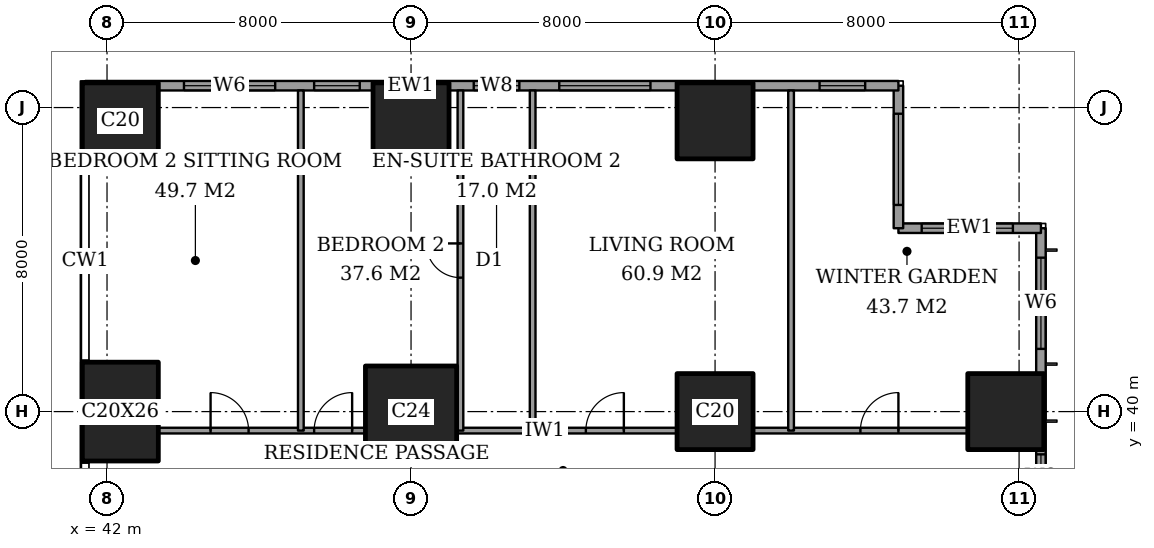
"""IFC4 building model, lengths in metres.
Left out: names, types, materials, properties, quantities, classifications, styles, units other than length and angle.
Written with IfcOpenShell. Run it as: python <this file> out.ifc"""

import sys

from ifc_helpers import new_model, si_unit, direction, frame, frame_2d, origin, origin_2d, place, context, subcontext, project, spatial, rectangle, extrude, element, fill, save


model = new_model("IFC4")
c1 = context("Model", 3, precision=1e-05, world=origin(), true_north=direction((0.0, 1.0)))
c2 = subcontext(c1, "Body", "Model", "MODEL_VIEW")
j1 = project(units=[si_unit("LENGTHUNIT", "METRE"), si_unit("PLANEANGLEUNIT", "RADIAN")], contexts=[c1])
p1 = place(None, origin())
s1 = spatial("IfcSite", under=j1, at=p1, CompositionType="ELEMENT")
p2 = place(p1, origin())
s2 = spatial("IfcBuilding", under=s1, at=p2, CompositionType="ELEMENT")
p3 = place(p2, frame((0.0, 0.0, 33.2)))
s3 = spatial("IfcBuildingStorey", under=s2, at=p3, CompositionType="ELEMENT", Elevation=33.2)
p4 = place(p3, frame((42.35, 40.0, 0.0), z_axis=(0.0, 0.0, 1.0), x_axis=(1.0, 0.0, 0.0)))
e1 = element("IfcColumn", 1, at=p4, inside=s3, PredefinedType="COLUMN", context=c2, shape_type="SweptSolid", body=[
    extrude(rectangle(XDim=2.0, YDim=2.6, at=origin_2d()), origin(), (0.0, 0.0, 1.0), 3.6),
])
p5 = place(p3, frame((42.35, 47.65, 0.0), z_axis=(0.0, 0.0, 1.0), x_axis=(1.0, 0.0, 0.0)))
e2 = element("IfcColumn", 2, at=p5, inside=s3, PredefinedType="COLUMN", context=c2, shape_type="SweptSolid", body=[
    extrude(rectangle(XDim=2.0, YDim=2.0, at=origin_2d()), origin(), (0.0, 0.0, 1.0), 3.6),
])
p6 = place(p3, frame((50.0, 40.0, 0.0), z_axis=(0.0, 0.0, 1.0), x_axis=(1.0, 0.0, 0.0)))
e3 = element("IfcColumn", 3, at=p6, inside=s3, PredefinedType="COLUMN", context=c2, shape_type="SweptSolid", body=[
    extrude(rectangle(XDim=2.4, YDim=2.4, at=origin_2d()), origin(), (0.0, 0.0, 1.0), 3.6),
])
for number, where, z_axis, x_axis in (
    (4, (50.0, 47.65, 0.0), (0.0, 0.0, 1.0), (1.0, 0.0, 0.0)),
    (5, (58.0, 40.0, 0.0), (0.0, 0.0, 1.0), (1.0, 0.0, 0.0)),
    (6, (58.0, 47.65, 0.0), (0.0, 0.0, 1.0), (1.0, 0.0, 0.0)),
    (7, (65.65, 40.0, 0.0), (0.0, 0.0, 1.0), (1.0, 0.0, 0.0)),
):
    element("IfcColumn", number, at=place(p3, frame(where, z_axis=z_axis, x_axis=x_axis)), inside=s3, PredefinedType="COLUMN", context=c2, shape_type="SweptSolid", body=[
        extrude(rectangle(XDim=2.0, YDim=2.0, at=origin_2d()), origin(), (0.0, 0.0, 1.0), 3.6),
    ])
p7 = place(p3, frame((66.575, 3.175, 0.0), z_axis=(0.0, 0.0, 1.0), x_axis=(0.0, 1.0, 0.0)))
e8 = element("IfcWall", 8, at=p7, inside=s3, PredefinedType="SOLIDWALL", context=c2, shape_type="SweptSolid", body=[
    extrude(rectangle(XDim=41.65, YDim=0.25, at=frame_2d((20.825, 0.0))), origin(), (0.0, 0.0, 1.0), 3.6),
])
p8 = place(p7, frame((0.775, 0.0, 0.6)))
e9 = element("IfcOpeningElement", 9, at=p8, cuts=e8, PredefinedType="OPENING", context=c2, shape_type="SweptSolid", body=[
    extrude(rectangle(XDim=2.4, YDim=2.0, at=frame_2d((1.2, 1.0))), frame((0.0, 0.135, 0.0), z_axis=(0.0, -1.0, 0.0), x_axis=(1.0, 0.0, 0.0)), (0.0, 0.0, 1.0), 0.27),
])
p9 = place(p7, frame((6.1, 0.0, 0.6)))
e10 = element("IfcOpeningElement", 10, at=p9, cuts=e8, PredefinedType="OPENING", context=c2, shape_type="SweptSolid", body=[
    extrude(rectangle(XDim=1.2, YDim=2.0, at=frame_2d((0.6, 1.0))), frame((0.0, 0.135, 0.0), z_axis=(0.0, -1.0, 0.0), x_axis=(1.0, 0.0, 0.0)), (0.0, 0.0, 1.0), 0.27),
])
p10 = place(p7, frame((8.275, 0.0, 0.6)))
e11 = element("IfcOpeningElement", 11, at=p10, cuts=e8, PredefinedType="OPENING", context=c2, shape_type="SweptSolid", body=[
    extrude(rectangle(XDim=2.4, YDim=2.0, at=frame_2d((1.2, 1.0))), frame((0.0, 0.135, 0.0), z_axis=(0.0, -1.0, 0.0), x_axis=(1.0, 0.0, 0.0)), (0.0, 0.0, 1.0), 0.27),
])
p11 = place(p7, frame((15.775, 0.0, 0.6)))
e12 = element("IfcOpeningElement", 12, at=p11, cuts=e8, PredefinedType="OPENING", context=c2, shape_type="SweptSolid", body=[
    extrude(rectangle(XDim=2.4, YDim=2.0, at=frame_2d((1.2, 1.0))), frame((0.0, 0.135, 0.0), z_axis=(0.0, -1.0, 0.0), x_axis=(1.0, 0.0, 0.0)), (0.0, 0.0, 1.0), 0.27),
])
p12 = place(p7, frame((23.475, 0.0, 0.6)))
e13 = element("IfcOpeningElement", 13, at=p12, cuts=e8, PredefinedType="OPENING", context=c2, shape_type="SweptSolid", body=[
    extrude(rectangle(XDim=2.4, YDim=2.0, at=frame_2d((1.2, 1.0))), frame((0.0, 0.135, 0.0), z_axis=(0.0, -1.0, 0.0), x_axis=(1.0, 0.0, 0.0)), (0.0, 0.0, 1.0), 0.27),
])
p13 = place(p7, frame((30.975, 0.0, 0.6)))
e14 = element("IfcOpeningElement", 14, at=p13, cuts=e8, PredefinedType="OPENING", context=c2, shape_type="SweptSolid", body=[
    extrude(rectangle(XDim=2.4, YDim=2.0, at=frame_2d((1.2, 1.0))), frame((0.0, 0.135, 0.0), z_axis=(0.0, -1.0, 0.0), x_axis=(1.0, 0.0, 0.0)), (0.0, 0.0, 1.0), 0.27),
])
p14 = place(p7, frame((34.5, 0.0, 0.6)))
e15 = element("IfcOpeningElement", 15, at=p14, cuts=e8, PredefinedType="OPENING", context=c2, shape_type="SweptSolid", body=[
    extrude(rectangle(XDim=1.2, YDim=2.0, at=frame_2d((0.6, 1.0))), frame((0.0, 0.135, 0.0), z_axis=(0.0, -1.0, 0.0), x_axis=(1.0, 0.0, 0.0)), (0.0, 0.0, 1.0), 0.27),
])
p15 = place(p7, frame((38.475, 0.0, 0.6)))
e16 = element("IfcOpeningElement", 16, at=p15, cuts=e8, PredefinedType="OPENING", context=c2, shape_type="SweptSolid", body=[
    extrude(rectangle(XDim=2.4, YDim=2.0, at=frame_2d((1.2, 1.0))), frame((0.0, 0.135, 0.0), z_axis=(0.0, -1.0, 0.0), x_axis=(1.0, 0.0, 0.0)), (0.0, 0.0, 1.0), 0.27),
])
p16 = place(p3, frame((66.575, 44.825, 0.0), z_axis=(0.0, 0.0, 1.0), x_axis=(-1.0, 0.0, 0.0)))
e17 = element("IfcWall", 17, at=p16, inside=s3, PredefinedType="SOLIDWALL", context=c2, shape_type="SweptSolid", body=[
    extrude(rectangle(XDim=3.75, YDim=0.25, at=frame_2d((1.875, 0.0))), origin(), (0.0, 0.0, 1.0), 3.6),
])
p17 = place(p16, frame((0.738, 0.0, 0.6)))
e18 = element("IfcOpeningElement", 18, at=p17, cuts=e17, PredefinedType="OPENING", context=c2, shape_type="SweptSolid", body=[
    extrude(rectangle(XDim=2.4, YDim=2.0, at=frame_2d((1.2, 1.0))), frame((0.0, 0.135, 0.0), z_axis=(0.0, -1.0, 0.0), x_axis=(1.0, 0.0, 0.0)), (0.0, 0.0, 1.0), 0.27),
])
p18 = place(p3, frame((62.825, 44.825, 0.0), z_axis=(0.0, 0.0, 1.0), x_axis=(0.0, 1.0, 0.0)))
e19 = element("IfcWall", 19, at=p18, inside=s3, PredefinedType="SOLIDWALL", context=c2, shape_type="SweptSolid", body=[
    extrude(rectangle(XDim=3.75, YDim=0.25, at=frame_2d((1.875, 0.0))), origin(), (0.0, 0.0, 1.0), 3.6),
])
p19 = place(p18, frame((0.613, 0.0, 0.6)))
e20 = element("IfcOpeningElement", 20, at=p19, cuts=e19, PredefinedType="OPENING", context=c2, shape_type="SweptSolid", body=[
    extrude(rectangle(XDim=2.4, YDim=2.0, at=frame_2d((1.2, 1.0))), frame((0.0, 0.135, 0.0), z_axis=(0.0, -1.0, 0.0), x_axis=(1.0, 0.0, 0.0)), (0.0, 0.0, 1.0), 0.27),
])
p20 = place(p3, frame((62.825, 48.575, 0.0), z_axis=(0.0, 0.0, 1.0), x_axis=(-1.0, 0.0, 0.0)))
e21 = element("IfcWall", 21, at=p20, inside=s3, PredefinedType="SOLIDWALL", context=c2, shape_type="SweptSolid", body=[
    extrude(rectangle(XDim=21.4, YDim=0.25, at=frame_2d((10.7, 0.0))), origin(), (0.0, 0.0, 1.0), 3.6),
])
p21 = place(p20, frame((0.875, 0.0, 0.6)))
e22 = element("IfcOpeningElement", 22, at=p21, cuts=e21, PredefinedType="OPENING", context=c2, shape_type="SweptSolid", body=[
    extrude(rectangle(XDim=1.2, YDim=2.0, at=frame_2d((0.6, 1.0))), frame((0.0, 0.135, 0.0), z_axis=(0.0, -1.0, 0.0), x_axis=(1.0, 0.0, 0.0)), (0.0, 0.0, 1.0), 0.27),
])
p22 = place(p20, frame((6.525, 0.0, 0.6)))
e23 = element("IfcOpeningElement", 23, at=p22, cuts=e21, PredefinedType="OPENING", context=c2, shape_type="SweptSolid", body=[
    extrude(rectangle(XDim=2.4, YDim=2.0, at=frame_2d((1.2, 1.0))), frame((0.0, 0.135, 0.0), z_axis=(0.0, -1.0, 0.0), x_axis=(1.0, 0.0, 0.0)), (0.0, 0.0, 1.0), 0.27),
])
p23 = place(p20, frame((9.975, 0.0, 0.6)))
e24 = element("IfcOpeningElement", 24, at=p23, cuts=e21, PredefinedType="OPENING", context=c2, shape_type="SweptSolid", body=[
    extrude(rectangle(XDim=1.2, YDim=2.0, at=frame_2d((0.6, 1.0))), frame((0.0, 0.135, 0.0), z_axis=(0.0, -1.0, 0.0), x_axis=(1.0, 0.0, 0.0)), (0.0, 0.0, 1.0), 0.27),
])
p24 = place(p20, frame((14.175, 0.0, 0.6)))
e25 = element("IfcOpeningElement", 25, at=p24, cuts=e21, PredefinedType="OPENING", context=c2, shape_type="SweptSolid", body=[
    extrude(rectangle(XDim=1.2, YDim=2.0, at=frame_2d((0.6, 1.0))), frame((0.0, 0.135, 0.0), z_axis=(0.0, -1.0, 0.0), x_axis=(1.0, 0.0, 0.0)), (0.0, 0.0, 1.0), 0.27),
])
p25 = place(p20, frame((16.4, 0.0, 0.6)))
e26 = element("IfcOpeningElement", 26, at=p25, cuts=e21, PredefinedType="OPENING", context=c2, shape_type="SweptSolid", body=[
    extrude(rectangle(XDim=2.4, YDim=2.0, at=frame_2d((1.2, 1.0))), frame((0.0, 0.135, 0.0), z_axis=(0.0, -1.0, 0.0), x_axis=(1.0, 0.0, 0.0)), (0.0, 0.0, 1.0), 0.27),
])
p26 = place(p3, frame((43.35, 39.5, 0.0), z_axis=(0.0, 0.0, 1.0), x_axis=(1.0, 0.0, 0.0)))
e27 = element("IfcWall", 27, at=p26, inside=s3, PredefinedType="PARTITIONING", context=c2, shape_type="SweptSolid", body=[
    extrude(rectangle(XDim=5.45, YDim=0.15, at=frame_2d((2.725, 0.0))), origin(), (0.0, 0.0, 1.0), 3.35),
])
p27 = place(p26, frame((4.1, 0.0, 0.0)))
e28 = element("IfcOpeningElement", 28, at=p27, cuts=e27, PredefinedType="OPENING", context=c2, shape_type="SweptSolid", body=[
    extrude(rectangle(XDim=1.0, YDim=2.1, at=frame_2d((0.5, 1.05))), frame((0.0, 0.085, 0.0), z_axis=(0.0, -1.0, 0.0), x_axis=(1.0, 0.0, 0.0)), (0.0, 0.0, 1.0), 0.17),
])
p28 = place(p26, frame((1.375, 0.0, 0.0)))
e29 = element("IfcOpeningElement", 29, at=p28, cuts=e27, PredefinedType="OPENING", context=c2, shape_type="SweptSolid", body=[
    extrude(rectangle(XDim=1.0, YDim=2.1, at=frame_2d((0.5, 1.05))), frame((0.0, 0.085, 0.0), z_axis=(0.0, -1.0, 0.0), x_axis=(1.0, 0.0, 0.0)), (0.0, 0.0, 1.0), 0.17),
])
p29 = place(p3, frame((51.2, 39.5, 0.0), z_axis=(0.0, 0.0, 1.0), x_axis=(1.0, 0.0, 0.0)))
e30 = element("IfcWall", 30, at=p29, inside=s3, PredefinedType="PARTITIONING", context=c2, shape_type="SweptSolid", body=[
    extrude(rectangle(XDim=5.8, YDim=0.15, at=frame_2d((2.9, 0.0))), origin(), (0.0, 0.0, 1.0), 3.35),
])
p30 = place(p29, frame((3.4, 0.0, 0.0)))
e31 = element("IfcOpeningElement", 31, at=p30, cuts=e30, PredefinedType="OPENING", context=c2, shape_type="SweptSolid", body=[
    extrude(rectangle(XDim=1.0, YDim=2.1, at=frame_2d((0.5, 1.05))), frame((0.0, 0.085, 0.0), z_axis=(0.0, -1.0, 0.0), x_axis=(1.0, 0.0, 0.0)), (0.0, 0.0, 1.0), 0.17),
])
p31 = place(p3, frame((59.0, 39.5, 0.0), z_axis=(0.0, 0.0, 1.0), x_axis=(1.0, 0.0, 0.0)))
e32 = element("IfcWall", 32, at=p31, inside=s3, PredefinedType="PARTITIONING", context=c2, shape_type="SweptSolid", body=[
    extrude(rectangle(XDim=5.65, YDim=0.15, at=frame_2d((2.825, 0.0))), origin(), (0.0, 0.0, 1.0), 3.35),
])
p32 = place(p31, frame((2.825, 0.0, 0.0)))
e33 = element("IfcOpeningElement", 33, at=p32, cuts=e32, PredefinedType="OPENING", context=c2, shape_type="SweptSolid", body=[
    extrude(rectangle(XDim=1.0, YDim=2.1, at=frame_2d((0.5, 1.05))), frame((0.0, 0.085, 0.0), z_axis=(0.0, -1.0, 0.0), x_axis=(1.0, 0.0, 0.0)), (0.0, 0.0, 1.0), 0.17),
])
p33 = place(p3, frame((47.1, 39.5, 0.0), z_axis=(0.0, 0.0, 1.0), x_axis=(0.0, 1.0, 0.0)))
e34 = element("IfcWall", 34, at=p33, inside=s3, PredefinedType="PARTITIONING", context=c2, shape_type="SweptSolid", body=[
    extrude(rectangle(XDim=8.95, YDim=0.15, at=frame_2d((4.475, 0.0))), origin(), (0.0, 0.0, 1.0), 3.35),
])
p34 = place(p3, frame((51.3, 39.5, 0.0), z_axis=(0.0, 0.0, 1.0), x_axis=(0.0, 1.0, 0.0)))
e35 = element("IfcWall", 35, at=p34, inside=s3, PredefinedType="PARTITIONING", context=c2, shape_type="SweptSolid", body=[
    extrude(rectangle(XDim=8.95, YDim=0.15, at=frame_2d((4.475, 0.0))), origin(), (0.0, 0.0, 1.0), 3.35),
])
p35 = place(p34, frame((4.025, 0.0, 0.0)))
e36 = element("IfcOpeningElement", 36, at=p35, cuts=e35, PredefinedType="OPENING", context=c2, shape_type="SweptSolid", body=[
    extrude(rectangle(XDim=0.9, YDim=2.1, at=frame_2d((0.45, 1.05))), frame((0.0, 0.085, 0.0), z_axis=(0.0, -1.0, 0.0), x_axis=(1.0, 0.0, 0.0)), (0.0, 0.0, 1.0), 0.17),
])
for number, where, z_axis, x_axis in (
    (37, (53.2, 39.5, 0.0), (0.0, 0.0, 1.0), (0.0, 1.0, 0.0)),
    (38, (60.0, 39.5, 0.0), (0.0, 0.0, 1.0), (0.0, 1.0, 0.0)),
):
    element("IfcWall", number, at=place(p3, frame(where, z_axis=z_axis, x_axis=x_axis)), inside=s3, PredefinedType="PARTITIONING", context=c2, shape_type="SweptSolid", body=[
        extrude(rectangle(XDim=8.95, YDim=0.15, at=frame_2d((4.475, 0.0))), origin(), (0.0, 0.0, 1.0), 3.35),
    ])
p36 = place(p14, origin())
e39 = element("IfcWindow", 39, at=p36, inside=s3, PartitioningType="SINGLE_PANEL", PredefinedType="WINDOW", context=c2, shape_type="SweptSolid", body=[
    extrude(rectangle(XDim=1.2, YDim=2.0, at=frame_2d((0.6, 1.0))), frame((0.0, 0.03, 0.0), z_axis=(0.0, -1.0, 0.0), x_axis=(1.0, 0.0, 0.0)), (0.0, 0.0, 1.0), 0.06),
])
fill(e15, e39)
p37 = place(p15, origin())
e40 = element("IfcWindow", 40, at=p37, inside=s3, PartitioningType="SINGLE_PANEL", PredefinedType="WINDOW", context=c2, shape_type="SweptSolid", body=[
    extrude(rectangle(XDim=2.4, YDim=2.0, at=frame_2d((1.2, 1.0))), frame((0.0, 0.03, 0.0), z_axis=(0.0, -1.0, 0.0), x_axis=(1.0, 0.0, 0.0)), (0.0, 0.0, 1.0), 0.06),
])
fill(e16, e40)
p38 = place(p17, origin())
e41 = element("IfcWindow", 41, at=p38, inside=s3, PartitioningType="SINGLE_PANEL", PredefinedType="WINDOW", context=c2, shape_type="SweptSolid", body=[
    extrude(rectangle(XDim=2.4, YDim=2.0, at=frame_2d((1.2, 1.0))), frame((0.0, 0.03, 0.0), z_axis=(0.0, -1.0, 0.0), x_axis=(1.0, 0.0, 0.0)), (0.0, 0.0, 1.0), 0.06),
])
fill(e18, e41)
p39 = place(p19, origin())
e42 = element("IfcWindow", 42, at=p39, inside=s3, PartitioningType="SINGLE_PANEL", PredefinedType="WINDOW", context=c2, shape_type="SweptSolid", body=[
    extrude(rectangle(XDim=2.4, YDim=2.0, at=frame_2d((1.2, 1.0))), frame((0.0, 0.03, 0.0), z_axis=(0.0, -1.0, 0.0), x_axis=(1.0, 0.0, 0.0)), (0.0, 0.0, 1.0), 0.06),
])
fill(e20, e42)
p40 = place(p21, origin())
e43 = element("IfcWindow", 43, at=p40, inside=s3, PartitioningType="SINGLE_PANEL", PredefinedType="WINDOW", context=c2, shape_type="SweptSolid", body=[
    extrude(rectangle(XDim=1.2, YDim=2.0, at=frame_2d((0.6, 1.0))), frame((0.0, 0.03, 0.0), z_axis=(0.0, -1.0, 0.0), x_axis=(1.0, 0.0, 0.0)), (0.0, 0.0, 1.0), 0.06),
])
fill(e22, e43)
p41 = place(p22, origin())
e44 = element("IfcWindow", 44, at=p41, inside=s3, PartitioningType="SINGLE_PANEL", PredefinedType="WINDOW", context=c2, shape_type="SweptSolid", body=[
    extrude(rectangle(XDim=2.4, YDim=2.0, at=frame_2d((1.2, 1.0))), frame((0.0, 0.03, 0.0), z_axis=(0.0, -1.0, 0.0), x_axis=(1.0, 0.0, 0.0)), (0.0, 0.0, 1.0), 0.06),
])
fill(e23, e44)
p42 = place(p23, origin())
e45 = element("IfcWindow", 45, at=p42, inside=s3, PartitioningType="SINGLE_PANEL", PredefinedType="WINDOW", context=c2, shape_type="SweptSolid", body=[
    extrude(rectangle(XDim=1.2, YDim=2.0, at=frame_2d((0.6, 1.0))), frame((0.0, 0.03, 0.0), z_axis=(0.0, -1.0, 0.0), x_axis=(1.0, 0.0, 0.0)), (0.0, 0.0, 1.0), 0.06),
])
fill(e24, e45)
p43 = place(p24, origin())
e46 = element("IfcWindow", 46, at=p43, inside=s3, PartitioningType="SINGLE_PANEL", PredefinedType="WINDOW", context=c2, shape_type="SweptSolid", body=[
    extrude(rectangle(XDim=1.2, YDim=2.0, at=frame_2d((0.6, 1.0))), frame((0.0, 0.03, 0.0), z_axis=(0.0, -1.0, 0.0), x_axis=(1.0, 0.0, 0.0)), (0.0, 0.0, 1.0), 0.06),
])
fill(e25, e46)
p44 = place(p25, origin())
e47 = element("IfcWindow", 47, at=p44, inside=s3, PartitioningType="SINGLE_PANEL", PredefinedType="WINDOW", context=c2, shape_type="SweptSolid", body=[
    extrude(rectangle(XDim=2.4, YDim=2.0, at=frame_2d((1.2, 1.0))), frame((0.0, 0.03, 0.0), z_axis=(0.0, -1.0, 0.0), x_axis=(1.0, 0.0, 0.0)), (0.0, 0.0, 1.0), 0.06),
])
fill(e26, e47)
p45 = place(p32, origin())
e48 = element("IfcDoor", 48, at=p45, inside=s3, OperationType="SINGLE_SWING_LEFT", PredefinedType="DOOR", context=c2, shape_type="SweptSolid", body=[
    extrude(rectangle(XDim=1.0, YDim=2.1, at=frame_2d((0.5, 1.05))), frame((0.0, 0.025, 0.0), z_axis=(0.0, -1.0, 0.0), x_axis=(1.0, 0.0, 0.0)), (0.0, 0.0, 1.0), 0.05),
])
fill(e33, e48)
p46 = place(p30, origin())
e49 = element("IfcDoor", 49, at=p46, inside=s3, OperationType="SINGLE_SWING_LEFT", PredefinedType="DOOR", context=c2, shape_type="SweptSolid", body=[
    extrude(rectangle(XDim=1.0, YDim=2.1, at=frame_2d((0.5, 1.05))), frame((0.0, 0.025, 0.0), z_axis=(0.0, -1.0, 0.0), x_axis=(1.0, 0.0, 0.0)), (0.0, 0.0, 1.0), 0.05),
])
fill(e31, e49)
p47 = place(p35, origin())
e50 = element("IfcDoor", 50, at=p47, inside=s3, OperationType="SINGLE_SWING_LEFT", PredefinedType="DOOR", context=c2, shape_type="SweptSolid", body=[
    extrude(rectangle(XDim=0.9, YDim=2.1, at=frame_2d((0.45, 1.05))), frame((0.0, 0.025, 0.0), z_axis=(0.0, -1.0, 0.0), x_axis=(1.0, 0.0, 0.0)), (0.0, 0.0, 1.0), 0.05),
])
fill(e36, e50)
p48 = place(p27, origin())
e51 = element("IfcDoor", 51, at=p48, inside=s3, OperationType="SINGLE_SWING_LEFT", PredefinedType="DOOR", context=c2, shape_type="SweptSolid", body=[
    extrude(rectangle(XDim=1.0, YDim=2.1, at=frame_2d((0.5, 1.05))), frame((0.0, 0.025, 0.0), z_axis=(0.0, -1.0, 0.0), x_axis=(1.0, 0.0, 0.0)), (0.0, 0.0, 1.0), 0.05),
])
fill(e28, e51)
p49 = place(p28, origin())
e52 = element("IfcDoor", 52, at=p49, inside=s3, OperationType="SINGLE_SWING_RIGHT", PredefinedType="DOOR", context=c2, shape_type="SweptSolid", body=[
    extrude(rectangle(XDim=1.0, YDim=2.1, at=frame_2d((0.5, 1.05))), frame((0.0, 0.025, 0.0), z_axis=(0.0, -1.0, 0.0), x_axis=(1.0, 0.0, 0.0)), (0.0, 0.0, 1.0), 0.05),
])
fill(e29, e52)
save(model, sys.argv[1])
